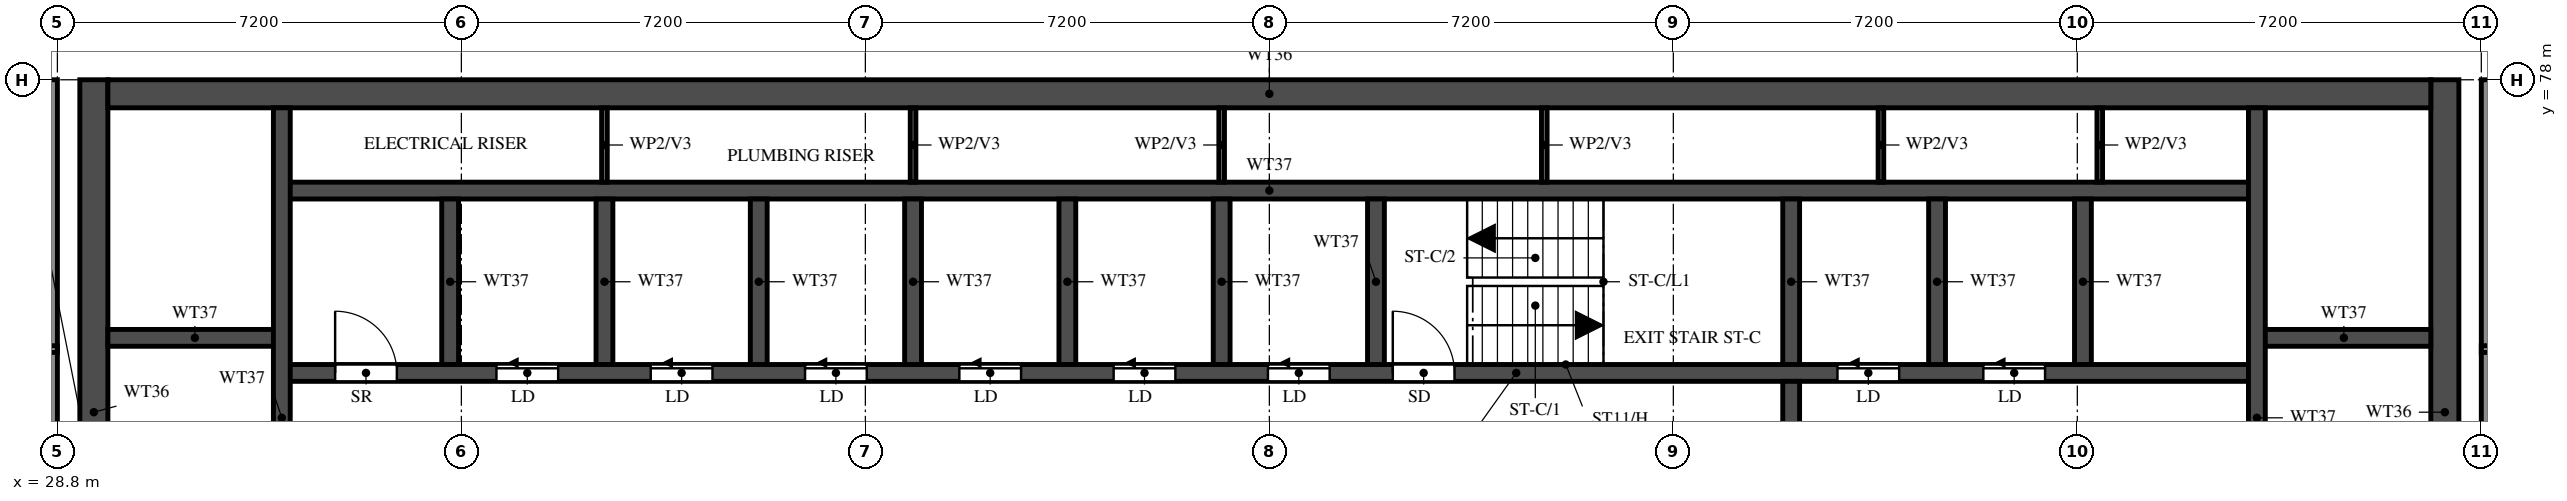
"""IFC4 building model, lengths in metres.
Left out: names, types, materials, properties, quantities, classifications, styles, units other than length and angle.
Written with IfcOpenShell. Run it as: python <this file> out.ifc"""

import sys

from ifc_helpers import new_model, si_unit, direction, frame, frame_2d, origin, place, context, subcontext, project, spatial, rectangle, extrude, element, fill, save


model = new_model("IFC4")
c1 = context("Model", 3, precision=1e-05, world=origin(), true_north=direction((0.0, 1.0)))
c2 = subcontext(c1, "Body", "Model", "MODEL_VIEW")
j1 = project(units=[si_unit("LENGTHUNIT", "METRE"), si_unit("PLANEANGLEUNIT", "RADIAN")], contexts=[c1])
p1 = place(None, origin())
s1 = spatial("IfcSite", under=j1, at=p1, CompositionType="ELEMENT")
p2 = place(p1, origin())
s2 = spatial("IfcBuilding", under=s1, at=p2, CompositionType="ELEMENT")
p3 = place(p2, frame((0.0, 0.0, 246.5)))
s3 = spatial("IfcBuildingStorey", under=s2, at=p3, CompositionType="ELEMENT", Elevation=246.5)
for number, where, z_axis, x_axis in (
    (1, (29.45, 66.15, 0.0), (0.0, 0.0, 1.0), (0.0, 1.0, 0.0)),
    (2, (71.35, 66.15, 0.0), (0.0, 0.0, 1.0), (0.0, 1.0, 0.0)),
):
    element("IfcWall", number, at=place(p3, frame(where, z_axis=z_axis, x_axis=x_axis)), inside=s3, PredefinedType="SHEAR", context=c2, shape_type="SweptSolid", body=[
        extrude(rectangle(XDim=11.85, YDim=0.5, at=frame_2d((5.925, 0.0))), origin(), (0.0, 0.0, 1.0), 3.22),
    ])
p4 = place(p3, frame((29.7, 77.75, 0.0), z_axis=(0.0, 0.0, 1.0), x_axis=(1.0, 0.0, 0.0)))
e3 = element("IfcWall", 3, at=p4, inside=s3, PredefinedType="SHEAR", context=c2, shape_type="SweptSolid", body=[
    extrude(rectangle(XDim=41.4, YDim=0.5, at=frame_2d((20.7, 0.0))), origin(), (0.0, 0.0, 1.0), 3.22),
])
p5 = place(p3, frame((32.8, 72.775, 0.0), z_axis=(0.0, 0.0, 1.0), x_axis=(1.0, 0.0, 0.0)))
e4 = element("IfcWall", 4, at=p5, inside=s3, PredefinedType="SHEAR", context=c2, shape_type="SweptSolid", body=[
    extrude(rectangle(XDim=35.2, YDim=0.3, at=frame_2d((17.6, 0.0))), origin(), (0.0, 0.0, 1.0), 3.22),
])
p6 = place(p5, frame((19.8, 0.0, 0.0)))
e5 = element("IfcOpeningElement", 5, at=p6, cuts=e4, PredefinedType="OPENING", context=c2, shape_type="SweptSolid", body=[
    extrude(rectangle(XDim=1.1, YDim=2.1, at=frame_2d((0.55, 1.05))), frame((0.0, 0.16, 0.0), z_axis=(0.0, -1.0, 0.0), x_axis=(1.0, 0.0, 0.0)), (0.0, 0.0, 1.0), 0.32),
])
p7 = place(p5, frame((27.725, 0.0, 0.0)))
e6 = element("IfcOpeningElement", 6, at=p7, cuts=e4, PredefinedType="OPENING", context=c2, shape_type="SweptSolid", body=[
    extrude(rectangle(XDim=1.1, YDim=2.1, at=frame_2d((0.55, 1.05))), frame((0.0, 0.16, 0.0), z_axis=(0.0, -1.0, 0.0), x_axis=(1.0, 0.0, 0.0)), (0.0, 0.0, 1.0), 0.32),
])
p8 = place(p5, frame((30.325, 0.0, 0.0)))
e7 = element("IfcOpeningElement", 7, at=p8, cuts=e4, PredefinedType="OPENING", context=c2, shape_type="SweptSolid", body=[
    extrude(rectangle(XDim=1.1, YDim=2.1, at=frame_2d((0.55, 1.05))), frame((0.0, 0.16, 0.0), z_axis=(0.0, -1.0, 0.0), x_axis=(1.0, 0.0, 0.0)), (0.0, 0.0, 1.0), 0.32),
])
p9 = place(p5, frame((3.825, 0.0, 0.0)))
e8 = element("IfcOpeningElement", 8, at=p9, cuts=e4, PredefinedType="OPENING", context=c2, shape_type="SweptSolid", body=[
    extrude(rectangle(XDim=1.1, YDim=2.1, at=frame_2d((0.55, 1.05))), frame((0.0, 0.16, 0.0), z_axis=(0.0, -1.0, 0.0), x_axis=(1.0, 0.0, 0.0)), (0.0, 0.0, 1.0), 0.32),
])
p10 = place(p5, frame((6.575, 0.0, 0.0)))
e9 = element("IfcOpeningElement", 9, at=p10, cuts=e4, PredefinedType="OPENING", context=c2, shape_type="SweptSolid", body=[
    extrude(rectangle(XDim=1.1, YDim=2.1, at=frame_2d((0.55, 1.05))), frame((0.0, 0.16, 0.0), z_axis=(0.0, -1.0, 0.0), x_axis=(1.0, 0.0, 0.0)), (0.0, 0.0, 1.0), 0.32),
])
p11 = place(p5, frame((9.325, 0.0, 0.0)))
e10 = element("IfcOpeningElement", 10, at=p11, cuts=e4, PredefinedType="OPENING", context=c2, shape_type="SweptSolid", body=[
    extrude(rectangle(XDim=1.1, YDim=2.1, at=frame_2d((0.55, 1.05))), frame((0.0, 0.16, 0.0), z_axis=(0.0, -1.0, 0.0), x_axis=(1.0, 0.0, 0.0)), (0.0, 0.0, 1.0), 0.32),
])
p12 = place(p5, frame((12.075, 0.0, 0.0)))
e11 = element("IfcOpeningElement", 11, at=p12, cuts=e4, PredefinedType="OPENING", context=c2, shape_type="SweptSolid", body=[
    extrude(rectangle(XDim=1.1, YDim=2.1, at=frame_2d((0.55, 1.05))), frame((0.0, 0.16, 0.0), z_axis=(0.0, -1.0, 0.0), x_axis=(1.0, 0.0, 0.0)), (0.0, 0.0, 1.0), 0.32),
])
p13 = place(p5, frame((14.825, 0.0, 0.0)))
e12 = element("IfcOpeningElement", 12, at=p13, cuts=e4, PredefinedType="OPENING", context=c2, shape_type="SweptSolid", body=[
    extrude(rectangle(XDim=1.1, YDim=2.1, at=frame_2d((0.55, 1.05))), frame((0.0, 0.16, 0.0), z_axis=(0.0, -1.0, 0.0), x_axis=(1.0, 0.0, 0.0)), (0.0, 0.0, 1.0), 0.32),
])
p14 = place(p5, frame((17.575, 0.0, 0.0)))
e13 = element("IfcOpeningElement", 13, at=p14, cuts=e4, PredefinedType="OPENING", context=c2, shape_type="SweptSolid", body=[
    extrude(rectangle(XDim=1.1, YDim=2.1, at=frame_2d((0.55, 1.05))), frame((0.0, 0.16, 0.0), z_axis=(0.0, -1.0, 0.0), x_axis=(1.0, 0.0, 0.0)), (0.0, 0.0, 1.0), 0.32),
])
p15 = place(p5, frame((0.95, 0.0, 0.0)))
e14 = element("IfcOpeningElement", 14, at=p15, cuts=e4, PredefinedType="OPENING", context=c2, shape_type="SweptSolid", body=[
    extrude(rectangle(XDim=1.1, YDim=2.1, at=frame_2d((0.55, 1.05))), frame((0.0, 0.16, 0.0), z_axis=(0.0, -1.0, 0.0), x_axis=(1.0, 0.0, 0.0)), (0.0, 0.0, 1.0), 0.32),
])
p16 = place(p3, frame((32.8, 76.025, 0.0), z_axis=(0.0, 0.0, 1.0), x_axis=(1.0, 0.0, 0.0)))
e15 = element("IfcWall", 15, at=p16, inside=s3, PredefinedType="SHEAR", context=c2, shape_type="SweptSolid", body=[
    extrude(rectangle(XDim=35.2, YDim=0.3, at=frame_2d((17.6, 0.0))), origin(), (0.0, 0.0, 1.0), 3.22),
])
for number, where, z_axis, x_axis in (
    (16, (29.7, 73.4, 0.0), (0.0, 0.0, 1.0), (1.0, 0.0, 0.0)),
    (17, (68.0, 73.4, 0.0), (0.0, 0.0, 1.0), (1.0, 0.0, 0.0)),
):
    element("IfcWall", number, at=place(p3, frame(where, z_axis=z_axis, x_axis=x_axis)), inside=s3, PredefinedType="SHEAR", context=c2, shape_type="SweptSolid", body=[
        extrude(rectangle(XDim=3.1, YDim=0.3, at=frame_2d((1.55, 0.0))), origin(), (0.0, 0.0, 1.0), 3.22),
    ])
p17 = place(p3, frame((32.8, 66.45, 0.0), z_axis=(0.0, 0.0, 1.0), x_axis=(0.0, 1.0, 0.0)))
e18 = element("IfcWall", 18, at=p17, inside=s3, PredefinedType="SHEAR", context=c2, shape_type="SweptSolid", body=[
    extrude(rectangle(XDim=11.05, YDim=0.3, at=frame_2d((5.525, 0.0))), origin(), (0.0, 0.0, 1.0), 3.22),
])
p18 = place(p3, frame((68.0, 66.45, 0.0), z_axis=(0.0, 0.0, 1.0), x_axis=(0.0, 1.0, 0.0)))
e19 = element("IfcWall", 19, at=p18, inside=s3, PredefinedType="SHEAR", context=c2, shape_type="SweptSolid", body=[
    extrude(rectangle(XDim=11.05, YDim=0.3, at=frame_2d((5.525, 0.0))), origin(), (0.0, 0.0, 1.0), 3.22),
])
p19 = place(p18, frame((0.15, 0.0, 0.0)))
e20 = element("IfcOpeningElement", 20, at=p19, cuts=e19, PredefinedType="OPENING", context=c2, shape_type="SweptSolid", body=[
    extrude(rectangle(XDim=1.1, YDim=2.1, at=frame_2d((0.55, 1.05))), frame((0.0, 0.16, 0.0), z_axis=(0.0, -1.0, 0.0), x_axis=(1.0, 0.0, 0.0)), (0.0, 0.0, 1.0), 0.32),
])
p20 = place(p3, frame((59.7, 66.45, 0.0), z_axis=(0.0, 0.0, 1.0), x_axis=(0.0, 1.0, 0.0)))
e21 = element("IfcWall", 21, at=p20, inside=s3, PredefinedType="SHEAR", context=c2, shape_type="SweptSolid", body=[
    extrude(rectangle(XDim=6.175, YDim=0.3, at=frame_2d((3.087, 0.0))), origin(), (0.0, 0.0, 1.0), 3.22),
])
p21 = place(p20, frame((3.85, 0.0, 0.0)))
e22 = element("IfcOpeningElement", 22, at=p21, cuts=e21, PredefinedType="OPENING", context=c2, shape_type="SweptSolid", body=[
    extrude(rectangle(XDim=1.2, YDim=2.1, at=frame_2d((0.6, 1.05))), frame((0.0, 0.16, 0.0), z_axis=(0.0, -1.0, 0.0), x_axis=(1.0, 0.0, 0.0)), (0.0, 0.0, 1.0), 0.32),
])
for number, where, z_axis, x_axis in (
    (23, (59.7, 72.925, 0.0), (0.0, 0.0, 1.0), (0.0, 1.0, 0.0)),
    (24, (35.8, 72.925, 0.0), (0.0, 0.0, 1.0), (0.0, 1.0, 0.0)),
    (25, (38.55, 72.925, 0.0), (0.0, 0.0, 1.0), (0.0, 1.0, 0.0)),
    (26, (41.3, 72.925, 0.0), (0.0, 0.0, 1.0), (0.0, 1.0, 0.0)),
    (27, (44.05, 72.925, 0.0), (0.0, 0.0, 1.0), (0.0, 1.0, 0.0)),
    (28, (46.8, 72.925, 0.0), (0.0, 0.0, 1.0), (0.0, 1.0, 0.0)),
    (29, (49.55, 72.925, 0.0), (0.0, 0.0, 1.0), (0.0, 1.0, 0.0)),
    (30, (52.3, 72.925, 0.0), (0.0, 0.0, 1.0), (0.0, 1.0, 0.0)),
    (31, (62.3, 72.925, 0.0), (0.0, 0.0, 1.0), (0.0, 1.0, 0.0)),
    (32, (64.9, 72.925, 0.0), (0.0, 0.0, 1.0), (0.0, 1.0, 0.0)),
):
    element("IfcWall", number, at=place(p3, frame(where, z_axis=z_axis, x_axis=x_axis)), inside=s3, PredefinedType="SHEAR", context=c2, shape_type="SweptSolid", body=[
        extrude(rectangle(XDim=2.95, YDim=0.3, at=frame_2d((1.475, 0.0))), origin(), (0.0, 0.0, 1.0), 3.22),
    ])
for number, where, z_axis, x_axis in (
    (33, (38.55, 76.175, 0.0), (0.0, 0.0, 1.0), (0.0, 1.0, 0.0)),
    (34, (44.05, 76.175, 0.0), (0.0, 0.0, 1.0), (0.0, 1.0, 0.0)),
    (35, (49.55, 76.175, 0.0), (0.0, 0.0, 1.0), (0.0, 1.0, 0.0)),
    (36, (55.3, 76.175, 0.0), (0.0, 0.0, 1.0), (0.0, 1.0, 0.0)),
    (37, (61.3, 76.175, 0.0), (0.0, 0.0, 1.0), (0.0, 1.0, 0.0)),
    (38, (65.2, 76.175, 0.0), (0.0, 0.0, 1.0), (0.0, 1.0, 0.0)),
):
    element("IfcWall", number, at=place(p3, frame(where, z_axis=z_axis, x_axis=x_axis)), inside=s3, PredefinedType="PARTITIONING", context=c2, shape_type="SweptSolid", body=[
        extrude(rectangle(XDim=1.325, YDim=0.1, at=frame_2d((0.663, 0.0))), origin(), (0.0, 0.0, 1.0), 3.22),
    ])
for number, where, z_axis, x_axis in (
    (39, (28.7, 62.4, 0.0), (0.0, 0.0, 1.0), (0.0, 1.0, 0.0)),
    (40, (72.1, 62.4, 0.0), (0.0, 0.0, 1.0), (0.0, 1.0, 0.0)),
):
    element("IfcWall", number, at=place(p3, frame(where, z_axis=z_axis, x_axis=x_axis)), inside=s3, PredefinedType="SOLIDWALL", context=c2, shape_type="SweptSolid", body=[
        extrude(rectangle(XDim=15.6, YDim=0.2, at=frame_2d((7.8, 0.0))), origin(), (0.0, 0.0, 1.0), 3.22),
    ])
p22 = place(p3, frame((18.525, 73.2, 0.0), z_axis=(0.0, 0.0, 1.0), x_axis=(1.0, 0.0, 0.0)))
e41 = element("IfcWall", 41, at=p22, inside=s3, PredefinedType="PARTITIONING", context=c2, shape_type="SweptSolid", body=[
    extrude(rectangle(XDim=10.275, YDim=0.12, at=frame_2d((5.138, 0.0))), origin(), (0.0, 0.0, 1.0), 2.32),
])
p23 = place(p22, frame((5.275, 0.0, 0.0)))
e42 = element("IfcOpeningElement", 42, at=p23, cuts=e41, PredefinedType="OPENING", context=c2, shape_type="SweptSolid", body=[
    extrude(rectangle(XDim=0.9, YDim=2.1, at=frame_2d((0.45, 1.05))), frame((0.0, 0.07, 0.0), z_axis=(0.0, -1.0, 0.0), x_axis=(1.0, 0.0, 0.0)), (0.0, 0.0, 1.0), 0.14),
])
p24 = place(p3, frame((72.0, 73.2, 0.0), z_axis=(0.0, 0.0, 1.0), x_axis=(1.0, 0.0, 0.0)))
e43 = element("IfcWall", 43, at=p24, inside=s3, PredefinedType="PARTITIONING", context=c2, shape_type="SweptSolid", body=[
    extrude(rectangle(XDim=10.275, YDim=0.12, at=frame_2d((5.137, 0.0))), origin(), (0.0, 0.0, 1.0), 2.32),
])
p25 = place(p24, frame((4.1, 0.0, 0.0)))
e44 = element("IfcOpeningElement", 44, at=p25, cuts=e43, PredefinedType="OPENING", context=c2, shape_type="SweptSolid", body=[
    extrude(rectangle(XDim=0.9, YDim=2.1, at=frame_2d((0.45, 1.05))), frame((0.0, 0.07, 0.0), z_axis=(0.0, -1.0, 0.0), x_axis=(1.0, 0.0, 0.0)), (0.0, 0.0, 1.0), 0.14),
])
p26 = place(p6, origin())
e45 = element("IfcDoor", 45, at=p26, inside=s3, OperationType="SINGLE_SWING_LEFT", PredefinedType="DOOR", context=c2, shape_type="SweptSolid", body=[
    extrude(rectangle(XDim=1.1, YDim=2.1, at=frame_2d((0.55, 1.05))), frame((0.0, 0.025, 0.0), z_axis=(0.0, -1.0, 0.0), x_axis=(1.0, 0.0, 0.0)), (0.0, 0.0, 1.0), 0.05),
])
fill(e5, e45)
p27 = place(p7, origin())
e46 = element("IfcDoor", 46, at=p27, inside=s3, OperationType="SLIDING_TO_LEFT", PredefinedType="DOOR", context=c2, shape_type="SweptSolid", body=[
    extrude(rectangle(XDim=1.1, YDim=2.1, at=frame_2d((0.55, 1.05))), frame((0.0, 0.025, 0.0), z_axis=(0.0, -1.0, 0.0), x_axis=(1.0, 0.0, 0.0)), (0.0, 0.0, 1.0), 0.05),
])
fill(e6, e46)
p28 = place(p8, origin())
e47 = element("IfcDoor", 47, at=p28, inside=s3, OperationType="SLIDING_TO_LEFT", PredefinedType="DOOR", context=c2, shape_type="SweptSolid", body=[
    extrude(rectangle(XDim=1.1, YDim=2.1, at=frame_2d((0.55, 1.05))), frame((0.0, 0.025, 0.0), z_axis=(0.0, -1.0, 0.0), x_axis=(1.0, 0.0, 0.0)), (0.0, 0.0, 1.0), 0.05),
])
fill(e7, e47)
p29 = place(p9, origin())
e48 = element("IfcDoor", 48, at=p29, inside=s3, OperationType="SLIDING_TO_LEFT", PredefinedType="DOOR", context=c2, shape_type="SweptSolid", body=[
    extrude(rectangle(XDim=1.1, YDim=2.1, at=frame_2d((0.55, 1.05))), frame((0.0, 0.025, 0.0), z_axis=(0.0, -1.0, 0.0), x_axis=(1.0, 0.0, 0.0)), (0.0, 0.0, 1.0), 0.05),
])
fill(e8, e48)
p30 = place(p10, origin())
e49 = element("IfcDoor", 49, at=p30, inside=s3, OperationType="SLIDING_TO_LEFT", PredefinedType="DOOR", context=c2, shape_type="SweptSolid", body=[
    extrude(rectangle(XDim=1.1, YDim=2.1, at=frame_2d((0.55, 1.05))), frame((0.0, 0.025, 0.0), z_axis=(0.0, -1.0, 0.0), x_axis=(1.0, 0.0, 0.0)), (0.0, 0.0, 1.0), 0.05),
])
fill(e9, e49)
p31 = place(p11, origin())
e50 = element("IfcDoor", 50, at=p31, inside=s3, OperationType="SLIDING_TO_LEFT", PredefinedType="DOOR", context=c2, shape_type="SweptSolid", body=[
    extrude(rectangle(XDim=1.1, YDim=2.1, at=frame_2d((0.55, 1.05))), frame((0.0, 0.025, 0.0), z_axis=(0.0, -1.0, 0.0), x_axis=(1.0, 0.0, 0.0)), (0.0, 0.0, 1.0), 0.05),
])
fill(e10, e50)
p32 = place(p12, origin())
e51 = element("IfcDoor", 51, at=p32, inside=s3, OperationType="SLIDING_TO_LEFT", PredefinedType="DOOR", context=c2, shape_type="SweptSolid", body=[
    extrude(rectangle(XDim=1.1, YDim=2.1, at=frame_2d((0.55, 1.05))), frame((0.0, 0.025, 0.0), z_axis=(0.0, -1.0, 0.0), x_axis=(1.0, 0.0, 0.0)), (0.0, 0.0, 1.0), 0.05),
])
fill(e11, e51)
p33 = place(p13, origin())
e52 = element("IfcDoor", 52, at=p33, inside=s3, OperationType="SLIDING_TO_LEFT", PredefinedType="DOOR", context=c2, shape_type="SweptSolid", body=[
    extrude(rectangle(XDim=1.1, YDim=2.1, at=frame_2d((0.55, 1.05))), frame((0.0, 0.025, 0.0), z_axis=(0.0, -1.0, 0.0), x_axis=(1.0, 0.0, 0.0)), (0.0, 0.0, 1.0), 0.05),
])
fill(e12, e52)
p34 = place(p14, origin())
e53 = element("IfcDoor", 53, at=p34, inside=s3, OperationType="SLIDING_TO_LEFT", PredefinedType="DOOR", context=c2, shape_type="SweptSolid", body=[
    extrude(rectangle(XDim=1.1, YDim=2.1, at=frame_2d((0.55, 1.05))), frame((0.0, 0.025, 0.0), z_axis=(0.0, -1.0, 0.0), x_axis=(1.0, 0.0, 0.0)), (0.0, 0.0, 1.0), 0.05),
])
fill(e13, e53)
p35 = place(p15, origin())
e54 = element("IfcDoor", 54, at=p35, inside=s3, OperationType="SINGLE_SWING_LEFT", PredefinedType="DOOR", context=c2, shape_type="SweptSolid", body=[
    extrude(rectangle(XDim=1.1, YDim=2.1, at=frame_2d((0.55, 1.05))), frame((0.0, 0.025, 0.0), z_axis=(0.0, -1.0, 0.0), x_axis=(1.0, 0.0, 0.0)), (0.0, 0.0, 1.0), 0.05),
])
fill(e14, e54)
save(model, sys.argv[1])
